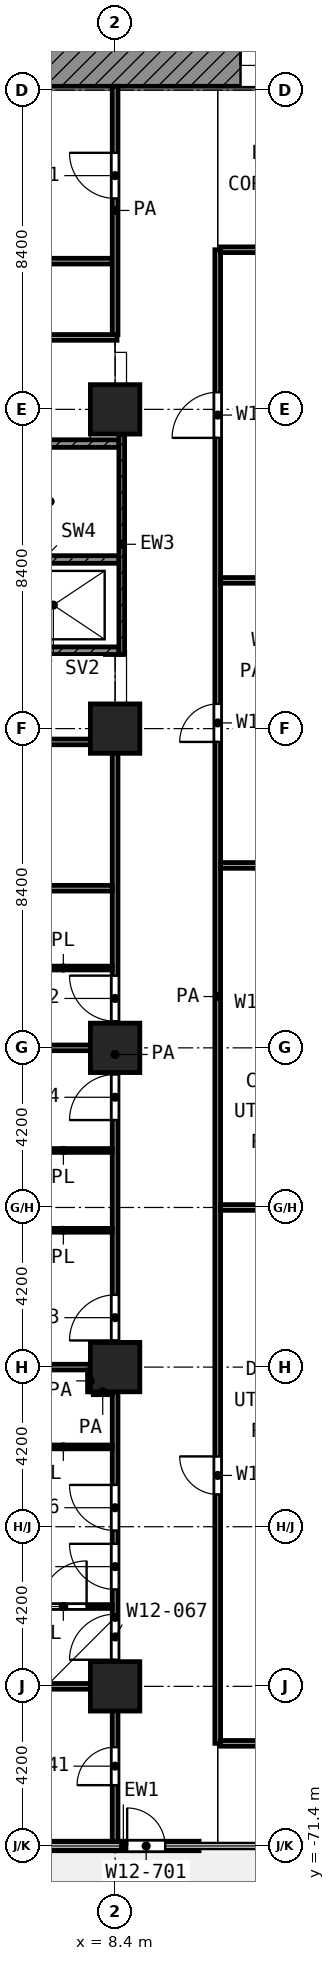
"""IFC4 building model, lengths in metres.
Left out: names, types, materials, properties, quantities, classifications, styles, units other than length and angle.
Written with IfcOpenShell. Run it as: python <this file> out.ifc"""

import sys

from ifc_helpers import new_model, si_unit, direction, frame, frame_2d, origin, origin_2d, place, context, subcontext, project, spatial, rectangle, extrude, element, fill, save


model = new_model("IFC4")
c1 = context("Model", 3, precision=1e-05, world=origin(), true_north=direction((0.0, 1.0)))
c2 = subcontext(c1, "Body", "Model", "MODEL_VIEW")
j1 = project(units=[si_unit("LENGTHUNIT", "METRE"), si_unit("PLANEANGLEUNIT", "RADIAN")], contexts=[c1])
p1 = place(None, origin())
s1 = spatial("IfcSite", under=j1, at=p1, CompositionType="ELEMENT")
p2 = place(p1, origin())
s2 = spatial("IfcBuilding", under=s1, at=p2, CompositionType="ELEMENT")
p3 = place(p2, frame((0.0, 0.0, 77.0)))
s3 = spatial("IfcBuildingStorey", under=s2, at=p3, CompositionType="ELEMENT", Elevation=77.0)
for number, where, z_axis, x_axis in (
    (1, (8.4, -33.6, 0.0), (0.0, 0.0, 1.0), (1.0, 0.0, 0.0)),
    (2, (8.4, -42.0, 0.0), (0.0, 0.0, 1.0), (1.0, 0.0, 0.0)),
    (3, (8.4, -50.4, 0.0), (0.0, 0.0, 1.0), (1.0, 0.0, 0.0)),
    (4, (8.4, -58.8, 0.0), (0.0, 0.0, 1.0), (1.0, 0.0, 0.0)),
    (5, (8.4, -67.2, 0.0), (0.0, 0.0, 1.0), (1.0, 0.0, 0.0)),
):
    element("IfcColumn", number, at=place(p3, frame(where, z_axis=z_axis, x_axis=x_axis)), inside=s3, PredefinedType="COLUMN", context=c2, shape_type="SweptSolid", body=[
        extrude(rectangle(XDim=1.3, YDim=1.3, at=origin_2d()), origin(), (0.0, 0.0, 1.0), 4.2),
    ])
p4 = place(p3, frame((6.625, -71.4, 0.0), z_axis=(0.0, 0.0, 1.0), x_axis=(1.0, 0.0, 0.0)))
e6 = element("IfcWall", 6, at=p4, inside=s3, PredefinedType="SOLIDWALL", context=c2, shape_type="SweptSolid", body=[
    extrude(rectangle(XDim=3.983, YDim=0.25, at=frame_2d((1.992, 0.0))), origin(), (0.0, 0.0, 1.0), 3.78),
])
p5 = place(p4, frame((2.092, 0.0, 0.0)))
e7 = element("IfcOpeningElement", 7, at=p5, cuts=e6, PredefinedType="OPENING", context=c2, shape_type="SweptSolid", body=[
    extrude(rectangle(XDim=1.0, YDim=2.1, at=frame_2d((0.5, 1.05))), frame((0.0, 0.135, 0.0), z_axis=(0.0, -1.0, 0.0), x_axis=(1.0, 0.0, 0.0)), (0.0, 0.0, 1.0), 0.27),
])
p6 = place(p3, frame((5.4, -24.55, 0.0), z_axis=(0.0, 0.0, 1.0), x_axis=(1.0, 0.0, 0.0)))
e8 = element("IfcWall", 8, at=p6, inside=s3, PredefinedType="SHEAR", context=c2, shape_type="SweptSolid", body=[
    extrude(rectangle(XDim=18.6, YDim=1.1, at=frame_2d((9.3, 0.0))), origin(), (0.0, 0.0, 1.0), 3.9),
])
p7 = place(p6, frame((6.3, 0.0, 0.0)))
e9 = element("IfcOpeningElement", 9, at=p7, cuts=e8, PredefinedType="OPENING", context=c2, shape_type="SweptSolid", body=[
    extrude(rectangle(XDim=1.8, YDim=2.1, at=frame_2d((0.9, 1.05))), frame((0.0, 0.56, 0.0), z_axis=(0.0, -1.0, 0.0), x_axis=(1.0, 0.0, 0.0)), (0.0, 0.0, 1.0), 1.12),
])
p8 = place(p3, frame((8.575, -40.05, 0.0), z_axis=(0.0, 0.0, 1.0), x_axis=(0.0, 1.0, 0.0)))
e10 = element("IfcWall", 10, at=p8, inside=s3, PredefinedType="SHEAR", context=c2, shape_type="SweptSolid", body=[
    extrude(rectangle(XDim=5.8, YDim=0.15, at=frame_2d((2.9, 0.0))), origin(), (0.0, 0.0, 1.0), 3.9),
])
p9 = place(p3, frame((0.45, -34.5, 0.0), z_axis=(0.0, 0.0, 1.0), x_axis=(1.0, 0.0, 0.0)))
e11 = element("IfcWall", 11, at=p9, inside=s3, PredefinedType="SHEAR", context=c2, shape_type="SweptSolid", body=[
    extrude(rectangle(XDim=8.05, YDim=0.2, at=frame_2d((4.025, 0.0))), origin(), (0.0, 0.0, 1.0), 3.9),
])
p10 = place(p9, frame((0.75, 0.0, 0.0)))
e12 = element("IfcOpeningElement", 12, at=p10, cuts=e11, PredefinedType="OPENING", context=c2, shape_type="SweptSolid", body=[
    extrude(rectangle(XDim=1.1, YDim=2.1, at=frame_2d((0.55, 1.05))), frame((0.0, 0.11, 0.0), z_axis=(0.0, -1.0, 0.0), x_axis=(1.0, 0.0, 0.0)), (0.0, 0.0, 1.0), 0.22),
])
p11 = place(p3, frame((0.45, -37.55, 0.0), z_axis=(0.0, 0.0, 1.0), x_axis=(1.0, 0.0, 0.0)))
e13 = element("IfcWall", 13, at=p11, inside=s3, PredefinedType="SHEAR", context=c2, shape_type="SweptSolid", body=[
    extrude(rectangle(XDim=8.05, YDim=0.2, at=frame_2d((4.025, 0.0))), origin(), (0.0, 0.0, 1.0), 3.9),
])
p12 = place(p11, frame((0.1, 0.0, 0.0)))
e14 = element("IfcOpeningElement", 14, at=p12, cuts=e13, PredefinedType="OPENING", context=c2, shape_type="SweptSolid", body=[
    extrude(rectangle(XDim=1.1, YDim=2.1, at=frame_2d((0.55, 1.05))), frame((0.0, 0.11, 0.0), z_axis=(0.0, -1.0, 0.0), x_axis=(1.0, 0.0, 0.0)), (0.0, 0.0, 1.0), 0.22),
])
p13 = place(p3, frame((0.45, -39.95, 0.0), z_axis=(0.0, 0.0, 1.0), x_axis=(1.0, 0.0, 0.0)))
e15 = element("IfcWall", 15, at=p13, inside=s3, PredefinedType="SHEAR", context=c2, shape_type="SweptSolid", body=[
    extrude(rectangle(XDim=8.05, YDim=0.2, at=frame_2d((4.025, 0.0))), origin(), (0.0, 0.0, 1.0), 3.9),
])
p14 = place(p13, frame((2.0, 0.0, 0.0)))
e16 = element("IfcOpeningElement", 16, at=p14, cuts=e15, PredefinedType="OPENING", context=c2, shape_type="SweptSolid", body=[
    extrude(rectangle(XDim=1.1, YDim=2.1, at=frame_2d((0.55, 1.05))), frame((0.0, 0.11, 0.0), z_axis=(0.0, -1.0, 0.0), x_axis=(1.0, 0.0, 0.0)), (0.0, 0.0, 1.0), 0.22),
])
p15 = place(p3, frame((5.75, -65.1, 0.0), z_axis=(0.0, 0.0, 1.0), x_axis=(1.0, 0.0, 0.0)))
e17 = element("IfcWall", 17, at=p15, inside=s3, PredefinedType="PARTITIONING", context=c2, shape_type="SweptSolid", body=[
    extrude(rectangle(XDim=2.575, YDim=0.1, at=frame_2d((1.288, 0.0))), origin(), (0.0, 0.0, 1.0), 3.9),
])
p16 = place(p15, frame((0.7, 0.0, 0.0)))
e18 = element("IfcOpeningElement", 18, at=p16, cuts=e17, PredefinedType="OPENING", context=c2, shape_type="SweptSolid", body=[
    extrude(rectangle(XDim=1.2, YDim=2.1, at=frame_2d((0.6, 1.05))), frame((0.0, 0.06, 0.0), z_axis=(0.0, -1.0, 0.0), x_axis=(1.0, 0.0, 0.0)), (0.0, 0.0, 1.0), 0.12),
])
p17 = place(p3, frame((5.75, -60.9, 0.0), z_axis=(0.0, 0.0, 1.0), x_axis=(1.0, 0.0, 0.0)))
e19 = element("IfcWall", 19, at=p17, inside=s3, PredefinedType="PARTITIONING", context=c2, shape_type="SweptSolid", body=[
    extrude(rectangle(XDim=2.575, YDim=0.1, at=frame_2d((1.288, 0.0))), origin(), (0.0, 0.0, 1.0), 3.9),
])
p18 = place(p3, frame((5.751, -55.2, 0.0), z_axis=(0.0, 0.0, 1.0), x_axis=(1.0, 0.0, 0.0)))
e20 = element("IfcWall", 20, at=p18, inside=s3, PredefinedType="PARTITIONING", context=c2, shape_type="SweptSolid", body=[
    extrude(rectangle(XDim=2.574, YDim=0.1, at=frame_2d((1.287, 0.0))), origin(), (0.0, 0.0, 1.0), 3.9),
])
p19 = place(p3, frame((5.752, -53.1, 0.0), z_axis=(0.0, 0.0, 1.0), x_axis=(1.0, 0.0, 0.0)))
e21 = element("IfcWall", 21, at=p19, inside=s3, PredefinedType="PARTITIONING", context=c2, shape_type="SweptSolid", body=[
    extrude(rectangle(XDim=2.573, YDim=0.1, at=frame_2d((1.287, 0.0))), origin(), (0.0, 0.0, 1.0), 3.9),
])
p20 = place(p3, frame((5.75, -48.3, 0.0), z_axis=(0.0, 0.0, 1.0), x_axis=(1.0, 0.0, 0.0)))
e22 = element("IfcWall", 22, at=p20, inside=s3, PredefinedType="PARTITIONING", context=c2, shape_type="SweptSolid", body=[
    extrude(rectangle(XDim=2.575, YDim=0.1, at=frame_2d((1.288, 0.0))), origin(), (0.0, 0.0, 1.0), 3.9),
])
p21 = place(p3, frame((11.175, -68.7, 0.0), z_axis=(0.0, 0.0, 1.0), x_axis=(1.0, 0.0, 0.0)))
e23 = element("IfcWall", 23, at=p21, inside=s3, PredefinedType="PARTITIONING", context=c2, shape_type="SweptSolid", body=[
    extrude(rectangle(XDim=2.85, YDim=0.15, at=frame_2d((1.425, 0.0))), origin(), (0.0, 0.0, 1.0), 3.9),
])
p22 = place(p3, frame((1.913, -67.2, 0.0), z_axis=(0.0, 0.0, 1.0), x_axis=(1.0, 0.0, 0.0)))
e24 = element("IfcWall", 24, at=p22, inside=s3, PredefinedType="PARTITIONING", context=c2, shape_type="SweptSolid", body=[
    extrude(rectangle(XDim=6.412, YDim=0.15, at=frame_2d((3.206, 0.0))), origin(), (0.0, 0.0, 1.0), 3.9),
])
p23 = place(p3, frame((7.825, -59.45, 0.0), z_axis=(0.0, 0.0, 1.0), x_axis=(1.0, 0.0, 0.0)))
e25 = element("IfcWall", 25, at=p23, inside=s3, PredefinedType="PARTITIONING", context=c2, shape_type="SweptSolid", body=[
    extrude(rectangle(XDim=0.498, YDim=0.15, at=frame_2d((0.249, 0.0))), origin(), (0.0, 0.0, 1.0), 3.9),
])
p24 = place(p3, frame((0.08, -58.8, 0.0), z_axis=(0.0, 0.0, 1.0), x_axis=(1.0, 0.0, 0.0)))
e26 = element("IfcWall", 26, at=p24, inside=s3, PredefinedType="PARTITIONING", context=c2, shape_type="SweptSolid", body=[
    extrude(rectangle(XDim=8.243, YDim=0.15, at=frame_2d((4.122, 0.0))), origin(), (0.0, 0.0, 1.0), 3.9),
])
p25 = place(p3, frame((11.175, -54.6, 0.0), z_axis=(0.0, 0.0, 1.0), x_axis=(1.0, 0.0, 0.0)))
e27 = element("IfcWall", 27, at=p25, inside=s3, PredefinedType="PARTITIONING", context=c2, shape_type="SweptSolid", body=[
    extrude(rectangle(XDim=2.85, YDim=0.15, at=frame_2d((1.425, 0.0))), origin(), (0.0, 0.0, 1.0), 3.9),
])
for number, where, z_axis, x_axis in (
    (28, (0.08, -50.4, 0.0), (0.0, 0.0, 1.0), (1.0, 0.0, 0.0)),
    (29, (0.08, -46.2, 0.0), (0.0, 0.0, 1.0), (1.0, 0.0, 0.0)),
):
    element("IfcWall", number, at=place(p3, frame(where, z_axis=z_axis, x_axis=x_axis)), inside=s3, PredefinedType="PARTITIONING", context=c2, shape_type="SweptSolid", body=[
        extrude(rectangle(XDim=8.245, YDim=0.15, at=frame_2d((4.123, 0.0))), origin(), (0.0, 0.0, 1.0), 3.9),
    ])
p26 = place(p3, frame((11.175, -45.6, 0.0), z_axis=(0.0, 0.0, 1.0), x_axis=(1.0, 0.0, 0.0)))
e30 = element("IfcWall", 30, at=p26, inside=s3, PredefinedType="PARTITIONING", context=c2, shape_type="SweptSolid", body=[
    extrude(rectangle(XDim=2.85, YDim=0.15, at=frame_2d((1.425, 0.0))), origin(), (0.0, 0.0, 1.0), 3.9),
])
p27 = place(p3, frame((2.327, -42.35, 0.0), z_axis=(0.0, 0.0, 1.0), x_axis=(1.0, 0.0, 0.0)))
e31 = element("IfcWall", 31, at=p27, inside=s3, PredefinedType="PARTITIONING", context=c2, shape_type="SweptSolid", body=[
    extrude(rectangle(XDim=5.998, YDim=0.15, at=frame_2d((2.999, 0.0))), origin(), (0.0, 0.0, 1.0), 3.9),
])
p28 = place(p27, frame((2.499, 0.0, 0.0)))
e32 = element("IfcOpeningElement", 32, at=p28, cuts=e31, PredefinedType="OPENING", context=c2, shape_type="SweptSolid", body=[
    extrude(rectangle(XDim=1.0, YDim=2.1, at=frame_2d((0.5, 1.05))), frame((0.0, 0.085, 0.0), z_axis=(0.0, -1.0, 0.0), x_axis=(1.0, 0.0, 0.0)), (0.0, 0.0, 1.0), 0.17),
])
p29 = place(p3, frame((11.175, -38.1, 0.0), z_axis=(0.0, 0.0, 1.0), x_axis=(1.0, 0.0, 0.0)))
e33 = element("IfcWall", 33, at=p29, inside=s3, PredefinedType="PARTITIONING", context=c2, shape_type="SweptSolid", body=[
    extrude(rectangle(XDim=2.85, YDim=0.15, at=frame_2d((1.425, 0.0))), origin(), (0.0, 0.0, 1.0), 3.9),
])
p30 = place(p3, frame((1.002, -31.707, 0.0), z_axis=(0.0, 0.0, 1.0), x_axis=(1.0, 0.0, 0.0)))
e34 = element("IfcWall", 34, at=p30, inside=s3, PredefinedType="PARTITIONING", context=c2, shape_type="SweptSolid", body=[
    extrude(rectangle(XDim=7.448, YDim=0.15, at=frame_2d((3.724, 0.0))), origin(), (0.0, 0.0, 1.0), 3.9),
])
p31 = place(p30, frame((3.199, 0.0, 0.0)))
e35 = element("IfcOpeningElement", 35, at=p31, cuts=e34, PredefinedType="OPENING", context=c2, shape_type="SweptSolid", body=[
    extrude(rectangle(XDim=1.0, YDim=2.1, at=frame_2d((0.5, 1.05))), frame((0.0, 0.085, 0.0), z_axis=(0.0, -1.0, 0.0), x_axis=(1.0, 0.0, 0.0)), (0.0, 0.0, 1.0), 0.17),
])
p32 = place(p3, frame((0.08, -29.7, 0.0), z_axis=(0.0, 0.0, 1.0), x_axis=(1.0, 0.0, 0.0)))
e36 = element("IfcWall", 36, at=p32, inside=s3, PredefinedType="PARTITIONING", context=c2, shape_type="SweptSolid", body=[
    extrude(rectangle(XDim=8.245, YDim=0.15, at=frame_2d((4.123, 0.0))), origin(), (0.0, 0.0, 1.0), 3.9),
])
p33 = place(p3, frame((11.175, -29.4, 0.0), z_axis=(0.0, 0.0, 1.0), x_axis=(1.0, 0.0, 0.0)))
e37 = element("IfcWall", 37, at=p33, inside=s3, PredefinedType="PARTITIONING", context=c2, shape_type="SweptSolid", body=[
    extrude(rectangle(XDim=2.85, YDim=0.15, at=frame_2d((1.425, 0.0))), origin(), (0.0, 0.0, 1.0), 3.9),
])
p34 = place(p3, frame((7.75, -59.45, 0.0), z_axis=(0.0, 0.0, 1.0), x_axis=(0.0, 1.0, 0.0)))
e38 = element("IfcWall", 38, at=p34, inside=s3, PredefinedType="PARTITIONING", context=c2, shape_type="SweptSolid", body=[
    extrude(rectangle(XDim=0.575, YDim=0.15, at=frame_2d((0.288, 0.0))), origin(), (0.0, 0.0, 1.0), 3.9),
])
p35 = place(p3, frame((8.4, -71.32, 0.0), z_axis=(0.0, 0.0, 1.0), x_axis=(0.0, 1.0, 0.0)))
e39 = element("IfcWall", 39, at=p35, inside=s3, PredefinedType="PARTITIONING", context=c2, shape_type="SweptSolid", body=[
    extrude(rectangle(XDim=11.868, YDim=0.15, at=frame_2d((5.934, 0.0))), origin(), (0.0, 0.0, 1.0), 3.9),
])
p36 = place(p35, frame((6.67, 0.0, 0.0)))
e40 = element("IfcOpeningElement", 40, at=p36, cuts=e39, PredefinedType="OPENING", context=c2, shape_type="SweptSolid", body=[
    extrude(rectangle(XDim=1.2, YDim=2.1, at=frame_2d((0.6, 1.05))), frame((0.0, 0.085, 0.0), z_axis=(0.0, -1.0, 0.0), x_axis=(1.0, 0.0, 0.0)), (0.0, 0.0, 1.0), 0.17),
])
p37 = place(p35, frame((8.22, 0.0, 0.0)))
e41 = element("IfcOpeningElement", 41, at=p37, cuts=e39, PredefinedType="OPENING", context=c2, shape_type="SweptSolid", body=[
    extrude(rectangle(XDim=1.2, YDim=2.1, at=frame_2d((0.6, 1.05))), frame((0.0, 0.085, 0.0), z_axis=(0.0, -1.0, 0.0), x_axis=(1.0, 0.0, 0.0)), (0.0, 0.0, 1.0), 0.17),
])
p38 = place(p35, frame((4.82, 0.0, 0.0)))
e42 = element("IfcOpeningElement", 42, at=p38, cuts=e39, PredefinedType="OPENING", context=c2, shape_type="SweptSolid", body=[
    extrude(rectangle(XDim=1.2, YDim=2.1, at=frame_2d((0.6, 1.05))), frame((0.0, 0.085, 0.0), z_axis=(0.0, -1.0, 0.0), x_axis=(1.0, 0.0, 0.0)), (0.0, 0.0, 1.0), 0.17),
])
p39 = place(p35, frame((1.52, 0.0, 0.0)))
e43 = element("IfcOpeningElement", 43, at=p39, cuts=e39, PredefinedType="OPENING", context=c2, shape_type="SweptSolid", body=[
    extrude(rectangle(XDim=1.0, YDim=2.1, at=frame_2d((0.5, 1.05))), frame((0.0, 0.085, 0.0), z_axis=(0.0, -1.0, 0.0), x_axis=(1.0, 0.0, 0.0)), (0.0, 0.0, 1.0), 0.17),
])
p40 = place(p3, frame((8.4, -58.798, 0.0), z_axis=(0.0, 0.0, 1.0), x_axis=(0.0, 1.0, 0.0)))
e44 = element("IfcWall", 44, at=p40, inside=s3, PredefinedType="PARTITIONING", context=c2, shape_type="SweptSolid", body=[
    extrude(rectangle(XDim=16.448, YDim=0.15, at=frame_2d((8.224, 0.0))), origin(), (0.0, 0.0, 1.0), 3.9),
])
p41 = place(p40, frame((9.098, 0.0, 0.0)))
e45 = element("IfcOpeningElement", 45, at=p41, cuts=e44, PredefinedType="OPENING", context=c2, shape_type="SweptSolid", body=[
    extrude(rectangle(XDim=1.2, YDim=2.1, at=frame_2d((0.6, 1.05))), frame((0.0, 0.085, 0.0), z_axis=(0.0, -1.0, 0.0), x_axis=(1.0, 0.0, 0.0)), (0.0, 0.0, 1.0), 0.17),
])
p42 = place(p40, frame((0.699, 0.0, 0.0)))
e46 = element("IfcOpeningElement", 46, at=p42, cuts=e44, PredefinedType="OPENING", context=c2, shape_type="SweptSolid", body=[
    extrude(rectangle(XDim=1.2, YDim=2.1, at=frame_2d((0.6, 1.05))), frame((0.0, 0.085, 0.0), z_axis=(0.0, -1.0, 0.0), x_axis=(1.0, 0.0, 0.0)), (0.0, 0.0, 1.0), 0.17),
])
p43 = place(p40, frame((6.498, 0.0, 0.0)))
e47 = element("IfcOpeningElement", 47, at=p43, cuts=e44, PredefinedType="OPENING", context=c2, shape_type="SweptSolid", body=[
    extrude(rectangle(XDim=1.2, YDim=2.1, at=frame_2d((0.6, 1.05))), frame((0.0, 0.085, 0.0), z_axis=(0.0, -1.0, 0.0), x_axis=(1.0, 0.0, 0.0)), (0.0, 0.0, 1.0), 0.17),
])
p44 = place(p3, frame((8.4, -31.632, 0.0), z_axis=(0.0, 0.0, 1.0), x_axis=(0.0, 1.0, 0.0)))
e48 = element("IfcWall", 48, at=p44, inside=s3, PredefinedType="PARTITIONING", context=c2, shape_type="SweptSolid", body=[
    extrude(rectangle(XDim=6.532, YDim=0.15, at=frame_2d((3.266, 0.0))), origin(), (0.0, 0.0, 1.0), 3.9),
])
p45 = place(p44, frame((3.582, 0.0, 0.0)))
e49 = element("IfcOpeningElement", 49, at=p45, cuts=e48, PredefinedType="OPENING", context=c2, shape_type="SweptSolid", body=[
    extrude(rectangle(XDim=1.2, YDim=2.1, at=frame_2d((0.6, 1.05))), frame((0.0, 0.085, 0.0), z_axis=(0.0, -1.0, 0.0), x_axis=(1.0, 0.0, 0.0)), (0.0, 0.0, 1.0), 0.17),
])
p46 = place(p3, frame((11.1, -68.7, 0.0), z_axis=(0.0, 0.0, 1.0), x_axis=(0.0, 1.0, 0.0)))
e50 = element("IfcWall", 50, at=p46, inside=s3, PredefinedType="PARTITIONING", context=c2, shape_type="SweptSolid", body=[
    extrude(rectangle(XDim=39.3, YDim=0.15, at=frame_2d((19.65, 0.0))), origin(), (0.0, 0.0, 1.0), 3.9),
])
p47 = place(p46, frame((34.35, 0.0, 0.0)))
e51 = element("IfcOpeningElement", 51, at=p47, cuts=e50, PredefinedType="OPENING", context=c2, shape_type="SweptSolid", body=[
    extrude(rectangle(XDim=1.2, YDim=2.1, at=frame_2d((0.6, 1.05))), frame((0.0, 0.085, 0.0), z_axis=(0.0, -1.0, 0.0), x_axis=(1.0, 0.0, 0.0)), (0.0, 0.0, 1.0), 0.17),
])
p48 = place(p46, frame((26.35, 0.0, 0.0)))
e52 = element("IfcOpeningElement", 52, at=p48, cuts=e50, PredefinedType="OPENING", context=c2, shape_type="SweptSolid", body=[
    extrude(rectangle(XDim=1.0, YDim=2.1, at=frame_2d((0.5, 1.05))), frame((0.0, 0.085, 0.0), z_axis=(0.0, -1.0, 0.0), x_axis=(1.0, 0.0, 0.0)), (0.0, 0.0, 1.0), 0.17),
])
p49 = place(p46, frame((6.55, 0.0, 0.0)))
e53 = element("IfcOpeningElement", 53, at=p49, cuts=e50, PredefinedType="OPENING", context=c2, shape_type="SweptSolid", body=[
    extrude(rectangle(XDim=1.0, YDim=2.1, at=frame_2d((0.5, 1.05))), frame((0.0, 0.085, 0.0), z_axis=(0.0, -1.0, 0.0), x_axis=(1.0, 0.0, 0.0)), (0.0, 0.0, 1.0), 0.17),
])
p50 = place(p5, origin())
e54 = element("IfcDoor", 54, at=p50, inside=s3, OperationType="SINGLE_SWING_LEFT", PredefinedType="DOOR", context=c2, shape_type="SweptSolid", body=[
    extrude(rectangle(XDim=1.0, YDim=2.1, at=frame_2d((0.5, 1.05))), frame((0.0, 0.025, 0.0), z_axis=(0.0, -1.0, 0.0), x_axis=(1.0, 0.0, 0.0)), (0.0, 0.0, 1.0), 0.05),
])
fill(e7, e54)
p51 = place(p7, origin())
e55 = element("IfcDoor", 55, at=p51, inside=s3, OperationType="DOUBLE_DOOR_SINGLE_SWING", PredefinedType="DOOR", context=c2, shape_type="SweptSolid", body=[
    extrude(rectangle(XDim=1.8, YDim=2.1, at=frame_2d((0.9, 1.05))), frame((0.0, 0.025, 0.0), z_axis=(0.0, -1.0, 0.0), x_axis=(1.0, 0.0, 0.0)), (0.0, 0.0, 1.0), 0.05),
])
fill(e9, e55)
p52 = place(p45, origin())
e56 = element("IfcDoor", 56, at=p52, inside=s3, OperationType="SINGLE_SWING_RIGHT", PredefinedType="DOOR", context=c2, shape_type="SweptSolid", body=[
    extrude(rectangle(XDim=1.2, YDim=2.1, at=frame_2d((0.6, 1.05))), frame((0.0, 0.025, 0.0), z_axis=(0.0, -1.0, 0.0), x_axis=(1.0, 0.0, 0.0)), (0.0, 0.0, 1.0), 0.05),
])
fill(e49, e56)
p53 = place(p41, origin())
e57 = element("IfcDoor", 57, at=p53, inside=s3, OperationType="SINGLE_SWING_RIGHT", PredefinedType="DOOR", context=c2, shape_type="SweptSolid", body=[
    extrude(rectangle(XDim=1.2, YDim=2.1, at=frame_2d((0.6, 1.05))), frame((0.0, 0.025, 0.0), z_axis=(0.0, -1.0, 0.0), x_axis=(1.0, 0.0, 0.0)), (0.0, 0.0, 1.0), 0.05),
])
fill(e45, e57)
p54 = place(p42, origin())
e58 = element("IfcDoor", 58, at=p54, inside=s3, OperationType="SINGLE_SWING_LEFT", PredefinedType="DOOR", context=c2, shape_type="SweptSolid", body=[
    extrude(rectangle(XDim=1.2, YDim=2.1, at=frame_2d((0.6, 1.05))), frame((0.0, 0.025, 0.0), z_axis=(0.0, -1.0, 0.0), x_axis=(1.0, 0.0, 0.0)), (0.0, 0.0, 1.0), 0.05),
])
fill(e46, e58)
p55 = place(p43, origin())
e59 = element("IfcDoor", 59, at=p55, inside=s3, OperationType="SINGLE_SWING_LEFT", PredefinedType="DOOR", context=c2, shape_type="SweptSolid", body=[
    extrude(rectangle(XDim=1.2, YDim=2.1, at=frame_2d((0.6, 1.05))), frame((0.0, 0.025, 0.0), z_axis=(0.0, -1.0, 0.0), x_axis=(1.0, 0.0, 0.0)), (0.0, 0.0, 1.0), 0.05),
])
fill(e47, e59)
p56 = place(p36, origin())
e60 = element("IfcDoor", 60, at=p56, inside=s3, OperationType="SINGLE_SWING_RIGHT", PredefinedType="DOOR", context=c2, shape_type="SweptSolid", body=[
    extrude(rectangle(XDim=1.2, YDim=2.1, at=frame_2d((0.6, 1.05))), frame((0.0, 0.025, 0.0), z_axis=(0.0, -1.0, 0.0), x_axis=(1.0, 0.0, 0.0)), (0.0, 0.0, 1.0), 0.05),
])
fill(e40, e60)
p57 = place(p37, origin())
e61 = element("IfcDoor", 61, at=p57, inside=s3, OperationType="SINGLE_SWING_RIGHT", PredefinedType="DOOR", context=c2, shape_type="SweptSolid", body=[
    extrude(rectangle(XDim=1.2, YDim=2.1, at=frame_2d((0.6, 1.05))), frame((0.0, 0.025, 0.0), z_axis=(0.0, -1.0, 0.0), x_axis=(1.0, 0.0, 0.0)), (0.0, 0.0, 1.0), 0.05),
])
fill(e41, e61)
p58 = place(p38, origin())
e62 = element("IfcDoor", 62, at=p58, inside=s3, OperationType="SINGLE_SWING_LEFT", PredefinedType="DOOR", context=c2, shape_type="SweptSolid", body=[
    extrude(rectangle(XDim=1.2, YDim=2.1, at=frame_2d((0.6, 1.05))), frame((0.0, 0.025, 0.0), z_axis=(0.0, -1.0, 0.0), x_axis=(1.0, 0.0, 0.0)), (0.0, 0.0, 1.0), 0.05),
])
fill(e42, e62)
p59 = place(p16, origin())
e63 = element("IfcDoor", 63, at=p59, inside=s3, OperationType="SINGLE_SWING_RIGHT", PredefinedType="DOOR", context=c2, shape_type="SweptSolid", body=[
    extrude(rectangle(XDim=1.2, YDim=2.1, at=frame_2d((0.6, 1.05))), frame((0.0, 0.025, 0.0), z_axis=(0.0, -1.0, 0.0), x_axis=(1.0, 0.0, 0.0)), (0.0, 0.0, 1.0), 0.05),
])
fill(e18, e63)
p60 = place(p39, origin())
e64 = element("IfcDoor", 64, at=p60, inside=s3, OperationType="SINGLE_SWING_LEFT", PredefinedType="DOOR", context=c2, shape_type="SweptSolid", body=[
    extrude(rectangle(XDim=1.0, YDim=2.1, at=frame_2d((0.5, 1.05))), frame((0.0, 0.025, 0.0), z_axis=(0.0, -1.0, 0.0), x_axis=(1.0, 0.0, 0.0)), (0.0, 0.0, 1.0), 0.05),
])
fill(e43, e64)
p61 = place(p47, origin())
e65 = element("IfcDoor", 65, at=p61, inside=s3, OperationType="SINGLE_SWING_LEFT", PredefinedType="DOOR", context=c2, shape_type="SweptSolid", body=[
    extrude(rectangle(XDim=1.2, YDim=2.1, at=frame_2d((0.6, 1.05))), frame((0.0, 0.025, 0.0), z_axis=(0.0, -1.0, 0.0), x_axis=(1.0, 0.0, 0.0)), (0.0, 0.0, 1.0), 0.05),
])
fill(e51, e65)
p62 = place(p48, origin())
e66 = element("IfcDoor", 66, at=p62, inside=s3, OperationType="SINGLE_SWING_LEFT", PredefinedType="DOOR", context=c2, shape_type="SweptSolid", body=[
    extrude(rectangle(XDim=1.0, YDim=2.1, at=frame_2d((0.5, 1.05))), frame((0.0, 0.025, 0.0), z_axis=(0.0, -1.0, 0.0), x_axis=(1.0, 0.0, 0.0)), (0.0, 0.0, 1.0), 0.05),
])
fill(e52, e66)
p63 = place(p49, origin())
e67 = element("IfcDoor", 67, at=p63, inside=s3, OperationType="SINGLE_SWING_RIGHT", PredefinedType="DOOR", context=c2, shape_type="SweptSolid", body=[
    extrude(rectangle(XDim=1.0, YDim=2.1, at=frame_2d((0.5, 1.05))), frame((0.0, 0.025, 0.0), z_axis=(0.0, -1.0, 0.0), x_axis=(1.0, 0.0, 0.0)), (0.0, 0.0, 1.0), 0.05),
])
fill(e53, e67)
save(model, sys.argv[1])
